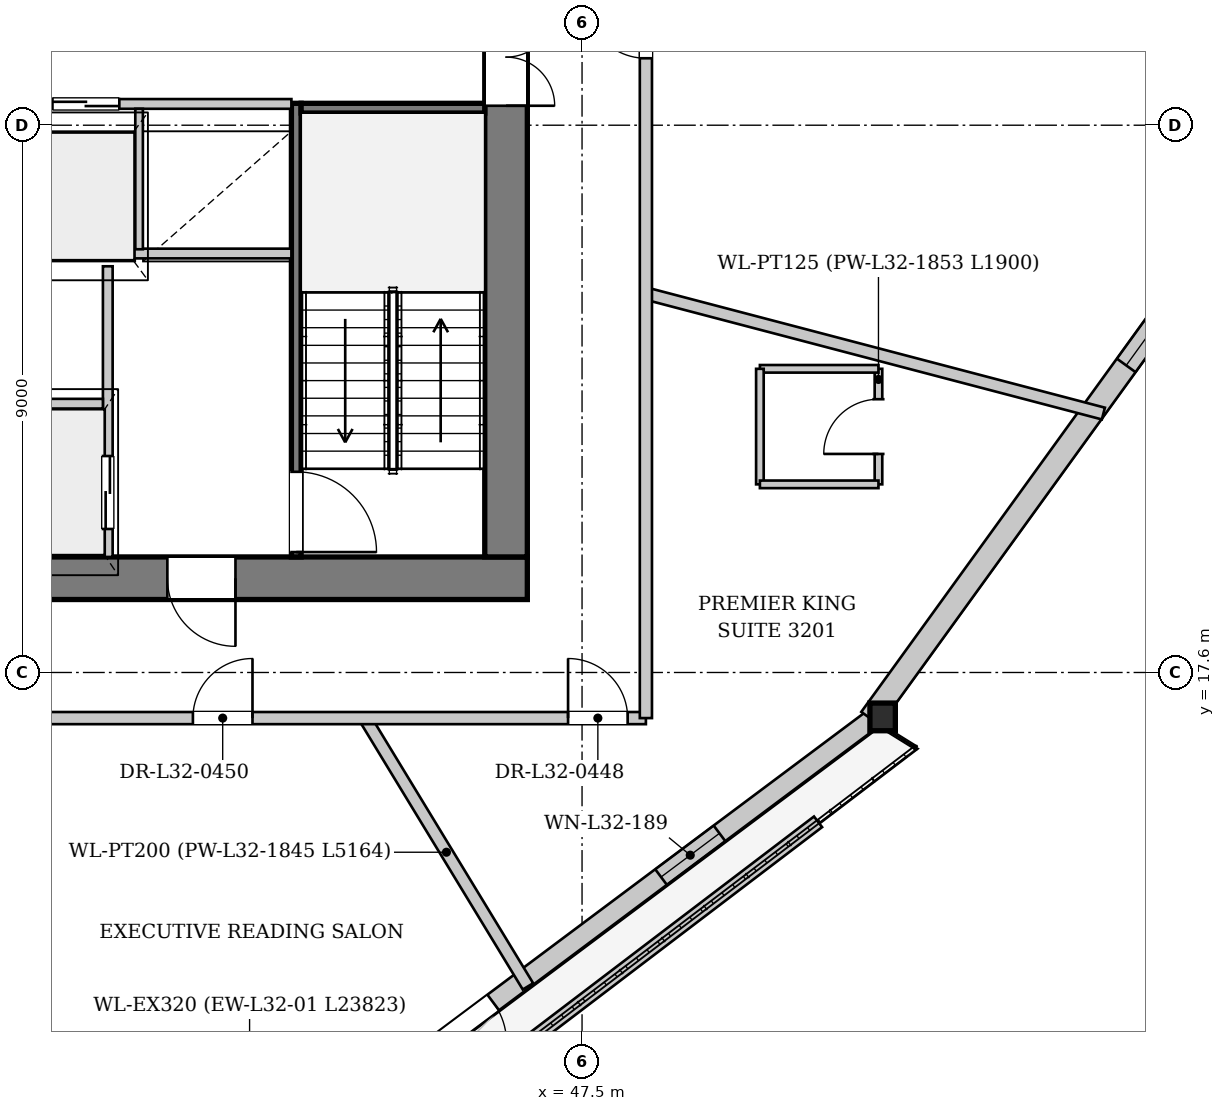
"""IFC4 building model, lengths in metres.
Left out: names, types, materials, properties, quantities, classifications, styles, units other than length and angle.
Written with IfcOpenShell. Run it as: python <this file> out.ifc"""

import sys

from ifc_helpers import new_model, si_unit, direction, frame, frame_2d, origin, origin_2d, place, context, subcontext, project, spatial, rectangle, i_section, extrude, source, transform, mapped, element, fill, save


model = new_model("IFC4")
c1 = context("Model", 3, precision=1e-05, world=origin(), true_north=direction((0.0, 1.0)))
c2 = subcontext(c1, "Body", "Model", "MODEL_VIEW")
j1 = project(units=[si_unit("LENGTHUNIT", "METRE"), si_unit("PLANEANGLEUNIT", "RADIAN")], contexts=[c1])
p1 = place(None, origin())
s1 = spatial("IfcSite", under=j1, at=p1, CompositionType="ELEMENT")
p2 = place(p1, origin())
s2 = spatial("IfcBuilding", under=s1, at=p2, CompositionType="ELEMENT")
p3 = place(p2, frame((0.0, 0.0, 123.45)))
s3 = spatial("IfcBuildingStorey", under=s2, at=p3, CompositionType="ELEMENT", Elevation=123.45)
m1 = source(origin(), c2, "Body", "SweptSolid", [
    extrude(i_section(OverallWidth=0.418, OverallDepth=0.455, WebThickness=0.038, FlangeThickness=0.059, at=origin_2d()), origin(), (0.0, 0.0, 1.0), 3.398),
])
p4 = place(p3, frame((52.4, 16.729, 0.0), z_axis=(0.025364652364, 0.082560865627, 0.996263187053), x_axis=(-0.955904837119, 0.293676594868, 0.0)))
e1 = element("IfcColumn", 1, at=p4, inside=s3, PredefinedType="COLUMN", context=c2, shape_type="MappedRepresentation", body=[
    mapped(m1, transform((0.0, 0.0, 0.0), x_axis=(1.0, 0.0, 0.0), y_axis=(0.0, 1.0, 0.0), z_axis=(0.0, 0.0, 1.0), scale=1.0)),
])
p5 = place(p3, frame((52.305, 16.857, 0.0), z_axis=(0.0, 0.0, 1.0), x_axis=(-0.800901761672, -0.598795764974, 0.0)))
e2 = element("IfcWall", 2, at=p5, inside=s3, PredefinedType="SOLIDWALL", context=c2, shape_type="SweptSolid", body=[
    extrude(rectangle(XDim=23.823, YDim=0.32, at=frame_2d((11.911, 0.0))), origin(), (0.0, 0.0, 1.0), 2.692),
])
p6 = place(p5, frame((7.823, 0.0, 0.0)))
e3 = element("IfcOpeningElement", 3, at=p6, cuts=e2, PredefinedType="OPENING", context=c2, shape_type="SweptSolid", body=[
    extrude(rectangle(XDim=1.1, YDim=2.3, at=frame_2d((0.55, 1.15))), frame((0.0, 0.17, 0.0), z_axis=(0.0, -1.0, 0.0), x_axis=(1.0, 0.0, 0.0)), (0.0, 0.0, 1.0), 0.34),
])
p7 = place(p5, frame((16.729, 0.0, 0.372)))
e4 = element("IfcOpeningElement", 4, at=p7, cuts=e2, PredefinedType="OPENING", context=c2, shape_type="SweptSolid", body=[
    extrude(rectangle(XDim=1.8, YDim=2.2, at=frame_2d((0.9, 1.1))), frame((0.0, 0.17, 0.0), z_axis=(0.0, -1.0, 0.0), x_axis=(1.0, 0.0, 0.0)), (0.0, 0.0, 1.0), 0.34),
])
p8 = place(p5, frame((3.177, 0.0, 0.65)))
e5 = element("IfcOpeningElement", 5, at=p8, cuts=e2, PredefinedType="OPENING", context=c2, shape_type="SweptSolid", body=[
    extrude(rectangle(XDim=1.2, YDim=1.5, at=frame_2d((0.6, 0.75))), frame((0.0, 0.17, 0.0), z_axis=(0.0, -1.0, 0.0), x_axis=(1.0, 0.0, 0.0)), (0.0, 0.0, 1.0), 0.34),
])
p9 = place(p3, frame((66.21, 36.142, 0.0), z_axis=(0.0, 0.0, 1.0), x_axis=(-0.586152279149, -0.810200904497, 0.0)))
e6 = element("IfcWall", 6, at=p9, inside=s3, PredefinedType="SOLIDWALL", context=c2, shape_type="SweptSolid", body=[
    extrude(rectangle(XDim=23.823, YDim=0.38, at=frame_2d((11.911, 0.0))), origin(), (0.0, 0.0, 1.0), 2.692),
])
p10 = place(p9, frame((5.57, 0.0, 0.322)))
e7 = element("IfcOpeningElement", 7, at=p10, cuts=e6, PredefinedType="OPENING", context=c2, shape_type="SweptSolid", body=[
    extrude(rectangle(XDim=2.2, YDim=2.25, at=frame_2d((1.1, 1.125))), frame((0.0, 0.2, 0.0), z_axis=(0.0, -1.0, 0.0), x_axis=(1.0, 0.0, 0.0)), (0.0, 0.0, 1.0), 0.4),
])
p11 = place(p9, frame((14.452, 0.0, 0.322)))
e8 = element("IfcOpeningElement", 8, at=p11, cuts=e6, PredefinedType="OPENING", context=c2, shape_type="SweptSolid", body=[
    extrude(rectangle(XDim=2.2, YDim=2.25, at=frame_2d((1.1, 1.125))), frame((0.0, 0.2, 0.0), z_axis=(0.0, -1.0, 0.0), x_axis=(1.0, 0.0, 0.0)), (0.0, 0.0, 1.0), 0.4),
])
p12 = place(p3, frame((34.529, 2.323, 0.0), z_axis=(0.0, 0.0, 1.0), x_axis=(0.795860822031, 0.605479604905, 0.0)))
e9 = element("IfcWall", 9, at=p12, inside=s3, PredefinedType="PARAPET", context=c2, shape_type="SweptSolid", body=[
    extrude(rectangle(XDim=21.175, YDim=0.22, at=frame_2d((10.587, 0.0))), origin(), (0.0, 0.0, 1.0), 0.3),
])
p13 = place(p3, frame((46.6, 19.15, 0.0), z_axis=(0.0, 0.0, 1.0), x_axis=(-1.0, 0.0, 0.0)))
e10 = element("IfcWall", 10, at=p13, inside=s3, PredefinedType="SHEAR", context=c2, shape_type="SweptSolid", body=[
    extrude(rectangle(XDim=17.2, YDim=0.7, at=frame_2d((8.6, 0.0))), origin(), (0.0, 0.0, 1.0), 3.3),
])
p14 = place(p13, frame((4.8, 0.0, 0.0)))
e11 = element("IfcOpeningElement", 11, at=p14, cuts=e10, PredefinedType="OPENING", context=c2, shape_type="SweptSolid", body=[
    extrude(rectangle(XDim=1.12, YDim=2.25, at=frame_2d((0.56, 1.125))), frame((0.0, 0.36, 0.0), z_axis=(0.0, -1.0, 0.0), x_axis=(1.0, 0.0, 0.0)), (0.0, 0.0, 1.0), 0.72),
])
p15 = place(p13, frame((11.3, 0.0, 0.0)))
e12 = element("IfcOpeningElement", 12, at=p15, cuts=e10, PredefinedType="OPENING", context=c2, shape_type="SweptSolid", body=[
    extrude(rectangle(XDim=1.12, YDim=2.25, at=frame_2d((0.56, 1.125))), frame((0.0, 0.36, 0.0), z_axis=(0.0, -1.0, 0.0), x_axis=(1.0, 0.0, 0.0)), (0.0, 0.0, 1.0), 0.72),
])
p16 = place(p3, frame((46.25, 33.7, 0.0), z_axis=(0.0, 0.0, 1.0), x_axis=(0.0, -1.0, 0.0)))
e13 = element("IfcWall", 13, at=p16, inside=s3, PredefinedType="SHEAR", context=c2, shape_type="SweptSolid", body=[
    extrude(rectangle(XDim=14.2, YDim=0.7, at=frame_2d((7.1, 0.0))), origin(), (0.0, 0.0, 1.0), 3.3),
])
p17 = place(p16, frame((5.18, 0.0, 0.0)))
e14 = element("IfcOpeningElement", 14, at=p17, cuts=e13, PredefinedType="OPENING", context=c2, shape_type="SweptSolid", body=[
    extrude(rectangle(XDim=1.6, YDim=2.2, at=frame_2d((0.8, 1.1))), frame((0.0, 0.36, 0.0), z_axis=(0.0, -1.0, 0.0), x_axis=(1.0, 0.0, 0.0)), (0.0, 0.0, 1.0), 0.72),
])
p18 = place(p3, frame((42.8, 26.96, 0.0), z_axis=(0.0, 0.0, 1.0), x_axis=(0.0, -1.0, 0.0)))
e15 = element("IfcWall", 15, at=p18, inside=s3, PredefinedType="PARTITIONING", context=c2, shape_type="SweptSolid", body=[
    extrude(rectangle(XDim=7.46, YDim=0.16, at=frame_2d((3.73, 0.0))), origin(), (0.0, 0.0, 1.0), 3.3),
])
p19 = place(p18, frame((6.06, 0.0, 0.0)))
e16 = element("IfcOpeningElement", 16, at=p19, cuts=e15, PredefinedType="OPENING", context=c2, shape_type="SweptSolid", body=[
    extrude(rectangle(XDim=1.32, YDim=2.2, at=frame_2d((0.66, 1.1))), frame((0.0, 0.09, 0.0), z_axis=(0.0, -1.0, 0.0), x_axis=(1.0, 0.0, 0.0)), (0.0, 0.0, 1.0), 0.18),
])
p20 = place(p3, frame((42.88, 26.88, 0.0), z_axis=(0.0, 0.0, 1.0), x_axis=(1.0, 0.0, 0.0)))
e17 = element("IfcWall", 17, at=p20, inside=s3, PredefinedType="PARTITIONING", context=c2, shape_type="SweptSolid", body=[
    extrude(rectangle(XDim=3.02, YDim=0.16, at=frame_2d((1.51, 0.0))), origin(), (0.0, 0.0, 1.0), 3.3),
])
p21 = place(p3, frame((39.7, 24.28, 0.0), z_axis=(0.0, 0.0, 1.0), x_axis=(0.0, -1.0, 0.0)))
e18 = element("IfcWall", 18, at=p21, inside=s3, PredefinedType="PARTITIONING", context=c2, shape_type="SweptSolid", body=[
    extrude(rectangle(XDim=4.78, YDim=0.16, at=frame_2d((2.39, 0.0))), origin(), (0.0, 0.0, 1.0), 3.3),
])
p22 = place(p21, frame((3.12, 0.0, 0.0)))
e19 = element("IfcOpeningElement", 19, at=p22, cuts=e18, PredefinedType="OPENING", context=c2, shape_type="SweptSolid", body=[
    extrude(rectangle(XDim=1.2, YDim=2.2, at=frame_2d((0.6, 1.1))), frame((0.0, 0.09, 0.0), z_axis=(0.0, -1.0, 0.0), x_axis=(1.0, 0.0, 0.0)), (0.0, 0.0, 1.0), 0.18),
])
p23 = place(p3, frame((36.38, 22.02, 0.0), z_axis=(0.0, 0.0, 1.0), x_axis=(1.0, 0.0, 0.0)))
e20 = element("IfcWall", 20, at=p23, inside=s3, PredefinedType="PARTITIONING", context=c2, shape_type="SweptSolid", body=[
    extrude(rectangle(XDim=3.24, YDim=0.16, at=frame_2d((1.62, 0.0))), origin(), (0.0, 0.0, 1.0), 3.3),
])
p24 = place(p3, frame((33.28, 24.49, 0.0), z_axis=(0.0, 0.0, 1.0), x_axis=(1.0, 0.0, 0.0)))
e21 = element("IfcWall", 21, at=p24, inside=s3, PredefinedType="PARTITIONING", context=c2, shape_type="SweptSolid", body=[
    extrude(rectangle(XDim=9.44, YDim=0.16, at=frame_2d((4.72, 0.0))), origin(), (0.0, 0.0, 1.0), 3.3),
])
p25 = place(p3, frame((33.28, 26.95, 0.0), z_axis=(0.0, 0.0, 1.0), x_axis=(1.0, 0.0, 0.0)))
e22 = element("IfcWall", 22, at=p25, inside=s3, PredefinedType="PARTITIONING", context=c2, shape_type="SweptSolid", body=[
    extrude(rectangle(XDim=9.44, YDim=0.16, at=frame_2d((4.72, 0.0))), origin(), (0.0, 0.0, 1.0), 3.3),
])
p26 = place(p25, frame((0.26, 0.0, 0.0)))
e23 = element("IfcOpeningElement", 23, at=p26, cuts=e22, PredefinedType="OPENING", context=c2, shape_type="SweptSolid", body=[
    extrude(rectangle(XDim=1.1, YDim=2.2, at=frame_2d((0.55, 1.1))), frame((0.0, 0.09, 0.0), z_axis=(0.0, -1.0, 0.0), x_axis=(1.0, 0.0, 0.0)), (0.0, 0.0, 1.0), 0.18),
])
p27 = place(p25, frame((2.01, 0.0, 0.0)))
e24 = element("IfcOpeningElement", 24, at=p27, cuts=e22, PredefinedType="OPENING", context=c2, shape_type="SweptSolid", body=[
    extrude(rectangle(XDim=1.1, YDim=2.2, at=frame_2d((0.55, 1.1))), frame((0.0, 0.09, 0.0), z_axis=(0.0, -1.0, 0.0), x_axis=(1.0, 0.0, 0.0)), (0.0, 0.0, 1.0), 0.18),
])
p28 = place(p25, frame((3.76, 0.0, 0.0)))
e25 = element("IfcOpeningElement", 25, at=p28, cuts=e22, PredefinedType="OPENING", context=c2, shape_type="SweptSolid", body=[
    extrude(rectangle(XDim=1.1, YDim=2.2, at=frame_2d((0.55, 1.1))), frame((0.0, 0.09, 0.0), z_axis=(0.0, -1.0, 0.0), x_axis=(1.0, 0.0, 0.0)), (0.0, 0.0, 1.0), 0.18),
])
p29 = place(p25, frame((5.51, 0.0, 0.0)))
e26 = element("IfcOpeningElement", 26, at=p29, cuts=e22, PredefinedType="OPENING", context=c2, shape_type="SweptSolid", body=[
    extrude(rectangle(XDim=1.1, YDim=2.2, at=frame_2d((0.55, 1.1))), frame((0.0, 0.09, 0.0), z_axis=(0.0, -1.0, 0.0), x_axis=(1.0, 0.0, 0.0)), (0.0, 0.0, 1.0), 0.18),
])
p30 = place(p3, frame((40.215, 24.56, 0.0), z_axis=(0.0, 0.0, 1.0), x_axis=(0.0, 1.0, 0.0)))
e27 = element("IfcWall", 27, at=p30, inside=s3, PredefinedType="PARTITIONING", context=c2, shape_type="SweptSolid", body=[
    extrude(rectangle(XDim=2.31, YDim=0.125, at=frame_2d((1.155, 0.0))), origin(), (0.0, 0.0, 1.0), 3.3),
])
p31 = place(p3, frame((43.928, 16.85, 0.0), z_axis=(0.0, 0.0, 1.0), x_axis=(0.519520898973, -0.85445774356, 0.0)))
e28 = element("IfcWall", 28, at=p31, inside=s3, PredefinedType="PARTITIONING", context=c2, shape_type="SweptSolid", body=[
    extrude(rectangle(XDim=5.164, YDim=0.2, at=frame_2d((2.582, 0.0))), origin(), (0.0, 0.0, 1.0), 3.3),
])
p32 = place(p3, frame((48.55, 23.832, 0.0), z_axis=(0.0, 0.0, 1.0), x_axis=(0.967269395898, -0.253751681295, 0.0)))
e29 = element("IfcWall", 29, at=p32, inside=s3, PredefinedType="PARTITIONING", context=c2, shape_type="SweptSolid", body=[
    extrude(rectangle(XDim=7.779, YDim=0.2, at=frame_2d((3.889, 0.0))), origin(), (0.0, 0.0, 1.0), 3.3),
])
p33 = place(p3, frame((52.375, 20.694, 0.0), z_axis=(0.0, 0.0, 1.0), x_axis=(0.0, 1.0, 0.0)))
e30 = element("IfcWall", 30, at=p33, inside=s3, PredefinedType="PARTITIONING", context=c2, shape_type="SweptSolid", body=[
    extrude(rectangle(XDim=1.9, YDim=0.125, at=frame_2d((0.95, 0.0))), origin(), (0.0, 0.0, 1.0), 3.3),
])
p34 = place(p33, frame((0.5, 0.0, 0.0)))
e31 = element("IfcOpeningElement", 31, at=p34, cuts=e30, PredefinedType="OPENING", context=c2, shape_type="SweptSolid", body=[
    extrude(rectangle(XDim=0.9, YDim=2.1, at=frame_2d((0.45, 1.05))), frame((0.0, 0.073, 0.0), z_axis=(0.0, -1.0, 0.0), x_axis=(1.0, 0.0, 0.0)), (0.0, 0.0, 1.0), 0.145),
])
p35 = place(p3, frame((52.375, 22.594, 0.0), z_axis=(0.0, 0.0, 1.0), x_axis=(-1.0, 0.0, 0.0)))
e32 = element("IfcWall", 32, at=p35, inside=s3, PredefinedType="PARTITIONING", context=c2, shape_type="SweptSolid", body=[
    extrude(rectangle(XDim=1.95, YDim=0.125, at=frame_2d((0.975, 0.0))), origin(), (0.0, 0.0, 1.0), 3.3),
])
p36 = place(p3, frame((50.425, 22.594, 0.0), z_axis=(0.0, 0.0, 1.0), x_axis=(0.0, -1.0, 0.0)))
e33 = element("IfcWall", 33, at=p36, inside=s3, PredefinedType="PARTITIONING", context=c2, shape_type="SweptSolid", body=[
    extrude(rectangle(XDim=1.9, YDim=0.125, at=frame_2d((0.95, 0.0))), origin(), (0.0, 0.0, 1.0), 3.3),
])
p37 = place(p3, frame((50.425, 20.694, 0.0), z_axis=(0.0, 0.0, 1.0), x_axis=(1.0, 0.0, 0.0)))
e34 = element("IfcWall", 34, at=p37, inside=s3, PredefinedType="PARTITIONING", context=c2, shape_type="SweptSolid", body=[
    extrude(rectangle(XDim=1.95, YDim=0.125, at=frame_2d((0.975, 0.0))), origin(), (0.0, 0.0, 1.0), 3.3),
])
p38 = place(p3, frame((27.45, 16.85, 0.0), z_axis=(0.0, 0.0, 1.0), x_axis=(1.0, 0.0, 0.0)))
e35 = element("IfcWall", 35, at=p38, inside=s3, PredefinedType="PARTITIONING", context=c2, shape_type="SweptSolid", body=[
    extrude(rectangle(XDim=21.1, YDim=0.2, at=frame_2d((10.55, 0.0))), origin(), (0.0, 0.0, 1.0), 2.985),
])
p39 = place(p38, frame((19.82, 0.0, 0.0)))
e36 = element("IfcOpeningElement", 36, at=p39, cuts=e35, PredefinedType="OPENING", context=c2, shape_type="SweptSolid", body=[
    extrude(rectangle(XDim=0.98, YDim=2.15, at=frame_2d((0.49, 1.075))), frame((0.0, 0.11, 0.0), z_axis=(0.0, -1.0, 0.0), x_axis=(1.0, 0.0, 0.0)), (0.0, 0.0, 1.0), 0.22),
])
p40 = place(p38, frame((2.494, 0.0, 0.0)))
e37 = element("IfcOpeningElement", 37, at=p40, cuts=e35, PredefinedType="OPENING", context=c2, shape_type="SweptSolid", body=[
    extrude(rectangle(XDim=0.98, YDim=2.15, at=frame_2d((0.49, 1.075))), frame((0.0, 0.11, 0.0), z_axis=(0.0, -1.0, 0.0), x_axis=(1.0, 0.0, 0.0)), (0.0, 0.0, 1.0), 0.22),
])
p41 = place(p38, frame((13.65, 0.0, 0.0)))
e38 = element("IfcOpeningElement", 38, at=p41, cuts=e35, PredefinedType="OPENING", context=c2, shape_type="SweptSolid", body=[
    extrude(rectangle(XDim=0.98, YDim=2.15, at=frame_2d((0.49, 1.075))), frame((0.0, 0.11, 0.0), z_axis=(0.0, -1.0, 0.0), x_axis=(1.0, 0.0, 0.0)), (0.0, 0.0, 1.0), 0.22),
])
p42 = place(p3, frame((48.55, 16.85, 0.0), z_axis=(0.0, 0.0, 1.0), x_axis=(0.0, 1.0, 0.0)))
e39 = element("IfcWall", 39, at=p42, inside=s3, PredefinedType="PARTITIONING", context=c2, shape_type="SweptSolid", body=[
    extrude(rectangle(XDim=19.5, YDim=0.2, at=frame_2d((9.75, 0.0))), origin(), (0.0, 0.0, 1.0), 3.3),
])
p43 = place(p42, frame((10.851, 0.0, 0.0)))
e40 = element("IfcOpeningElement", 40, at=p43, cuts=e39, PredefinedType="OPENING", context=c2, shape_type="SweptSolid", body=[
    extrude(rectangle(XDim=0.98, YDim=2.15, at=frame_2d((0.49, 1.075))), frame((0.0, 0.11, 0.0), z_axis=(0.0, -1.0, 0.0), x_axis=(1.0, 0.0, 0.0)), (0.0, 0.0, 1.0), 0.22),
])
m2 = source(origin(), c2, "Body", "SweptSolid", [
    extrude(rectangle(XDim=1.1, YDim=2.3, at=frame_2d((0.55, 1.15))), frame((0.0, 0.025, 0.0), z_axis=(0.0, -1.0, 0.0), x_axis=(1.0, 0.0, 0.0)), (0.0, 0.0, 1.0), 0.05),
])
p44 = place(p6, origin())
e41 = element("IfcDoor", 41, at=p44, inside=s3, OperationType="SINGLE_SWING_RIGHT", PredefinedType="DOOR", context=c2, shape_type="MappedRepresentation", body=[
    mapped(m2, transform((0.0, 0.0, 0.0), x_axis=(1.0, 0.0, 0.0), y_axis=(0.0, 1.0, 0.0), z_axis=(0.0, 0.0, 1.0), scale=1.0)),
])
fill(e3, e41)
m3 = source(origin(), c2, "Body", "SweptSolid", [
    extrude(rectangle(XDim=2.2, YDim=2.25, at=frame_2d((1.1, 1.125))), frame((0.0, 0.03, 0.0), z_axis=(0.0, -1.0, 0.0), x_axis=(1.0, 0.0, 0.0)), (0.0, 0.0, 1.0), 0.06),
])
p45 = place(p11, origin())
e42 = element("IfcWindow", 42, at=p45, inside=s3, PartitioningType="SINGLE_PANEL", PredefinedType="WINDOW", context=c2, shape_type="MappedRepresentation", body=[
    mapped(m3, transform((0.0, 0.0, 0.0), x_axis=(1.0, 0.0, 0.0), y_axis=(0.0, 1.0, 0.0), z_axis=(0.0, 0.0, 1.0), scale=1.0)),
])
fill(e8, e42)
m4 = source(origin(), c2, "Body", "SweptSolid", [
    extrude(rectangle(XDim=1.2, YDim=1.5, at=frame_2d((0.6, 0.75))), frame((0.0, 0.03, 0.0), z_axis=(0.0, -1.0, 0.0), x_axis=(1.0, 0.0, 0.0)), (0.0, 0.0, 1.0), 0.06),
])
p46 = place(p8, origin())
e43 = element("IfcWindow", 43, at=p46, inside=s3, PartitioningType="SINGLE_PANEL", PredefinedType="WINDOW", context=c2, shape_type="MappedRepresentation", body=[
    mapped(m4, transform((0.0, 0.0, 0.0), x_axis=(1.0, 0.0, 0.0), y_axis=(0.0, 1.0, 0.0), z_axis=(0.0, 0.0, 1.0), scale=1.0)),
])
fill(e5, e43)
m5 = source(origin(), c2, "Body", "SweptSolid", [
    extrude(rectangle(XDim=1.12, YDim=2.25, at=frame_2d((0.56, 1.125))), frame((0.0, 0.025, 0.0), z_axis=(0.0, -1.0, 0.0), x_axis=(1.0, 0.0, 0.0)), (0.0, 0.0, 1.0), 0.05),
])
p47 = place(p14, origin())
e44 = element("IfcDoor", 44, at=p47, inside=s3, OperationType="SINGLE_SWING_LEFT", PredefinedType="DOOR", context=c2, shape_type="MappedRepresentation", body=[
    mapped(m5, transform((0.0, 0.0, 0.0), x_axis=(1.0, 0.0, 0.0), y_axis=(0.0, 1.0, 0.0), z_axis=(0.0, 0.0, 1.0), scale=1.0)),
])
fill(e11, e44)
m6 = source(origin(), c2, "Body", "SweptSolid", [
    extrude(rectangle(XDim=1.6, YDim=2.2, at=frame_2d((0.8, 1.1))), frame((0.0, 0.025, 0.0), z_axis=(0.0, -1.0, 0.0), x_axis=(1.0, 0.0, 0.0)), (0.0, 0.0, 1.0), 0.05),
])
p48 = place(p17, origin())
e45 = element("IfcDoor", 45, at=p48, inside=s3, OperationType="DOUBLE_DOOR_SINGLE_SWING", PredefinedType="DOOR", context=c2, shape_type="MappedRepresentation", body=[
    mapped(m6, transform((0.0, 0.0, 0.0), x_axis=(1.0, 0.0, 0.0), y_axis=(0.0, 1.0, 0.0), z_axis=(0.0, 0.0, 1.0), scale=1.0)),
])
fill(e14, e45)
m7 = source(origin(), c2, "Body", "SweptSolid", [
    extrude(rectangle(XDim=1.32, YDim=2.2, at=frame_2d((0.66, 1.1))), frame((0.0, 0.025, 0.0), z_axis=(0.0, -1.0, 0.0), x_axis=(1.0, 0.0, 0.0)), (0.0, 0.0, 1.0), 0.05),
])
p49 = place(p19, origin())
e46 = element("IfcDoor", 46, at=p49, inside=s3, OperationType="SINGLE_SWING_RIGHT", PredefinedType="DOOR", context=c2, shape_type="MappedRepresentation", body=[
    mapped(m7, transform((0.0, 0.0, 0.0), x_axis=(1.0, 0.0, 0.0), y_axis=(0.0, 1.0, 0.0), z_axis=(0.0, 0.0, 1.0), scale=1.0)),
])
fill(e16, e46)
m8 = source(origin(), c2, "Body", "SweptSolid", [
    extrude(rectangle(XDim=1.2, YDim=2.2, at=frame_2d((0.6, 1.1))), frame((0.0, 0.025, 0.0), z_axis=(0.0, -1.0, 0.0), x_axis=(1.0, 0.0, 0.0)), (0.0, 0.0, 1.0), 0.05),
])
p50 = place(p22, origin())
e47 = element("IfcDoor", 47, at=p50, inside=s3, OperationType="DOUBLE_DOOR_SLIDING", PredefinedType="DOOR", context=c2, shape_type="MappedRepresentation", body=[
    mapped(m8, transform((0.0, 0.0, 0.0), x_axis=(1.0, 0.0, 0.0), y_axis=(0.0, 1.0, 0.0), z_axis=(0.0, 0.0, 1.0), scale=1.0)),
])
fill(e19, e47)
m9 = source(origin(), c2, "Body", "SweptSolid", [
    extrude(rectangle(XDim=1.1, YDim=2.2, at=frame_2d((0.55, 1.1))), frame((0.0, 0.025, 0.0), z_axis=(0.0, -1.0, 0.0), x_axis=(1.0, 0.0, 0.0)), (0.0, 0.0, 1.0), 0.05),
])
p51 = place(p29, origin())
e48 = element("IfcDoor", 48, at=p51, inside=s3, OperationType="DOUBLE_DOOR_SLIDING", PredefinedType="DOOR", context=c2, shape_type="MappedRepresentation", body=[
    mapped(m9, transform((0.0, 0.0, 0.0), x_axis=(1.0, 0.0, 0.0), y_axis=(0.0, 1.0, 0.0), z_axis=(0.0, 0.0, 1.0), scale=1.0)),
])
fill(e26, e48)
m10 = source(origin(), c2, "Body", "SweptSolid", [
    extrude(rectangle(XDim=0.9, YDim=2.1, at=frame_2d((0.45, 1.05))), frame((0.0, 0.025, 0.0), z_axis=(0.0, -1.0, 0.0), x_axis=(1.0, 0.0, 0.0)), (0.0, 0.0, 1.0), 0.05),
])
p52 = place(p34, origin())
e49 = element("IfcDoor", 49, at=p52, inside=s3, OperationType="SINGLE_SWING_LEFT", PredefinedType="DOOR", context=c2, shape_type="MappedRepresentation", body=[
    mapped(m10, transform((0.0, 0.0, 0.0), x_axis=(1.0, 0.0, 0.0), y_axis=(0.0, 1.0, 0.0), z_axis=(0.0, 0.0, 1.0), scale=1.0)),
])
fill(e31, e49)
m11 = source(origin(), c2, "Body", "SweptSolid", [
    extrude(rectangle(XDim=0.98, YDim=2.15, at=frame_2d((0.49, 1.075))), frame((0.0, 0.025, 0.0), z_axis=(0.0, -1.0, 0.0), x_axis=(1.0, 0.0, 0.0)), (0.0, 0.0, 1.0), 0.05),
])
p53 = place(p39, origin())
e50 = element("IfcDoor", 50, at=p53, inside=s3, OperationType="SINGLE_SWING_LEFT", PredefinedType="DOOR", context=c2, shape_type="MappedRepresentation", body=[
    mapped(m11, transform((0.0, 0.0, 0.0), x_axis=(1.0, 0.0, 0.0), y_axis=(0.0, 1.0, 0.0), z_axis=(0.0, 0.0, 1.0), scale=1.0)),
])
fill(e36, e50)
p54 = place(p41, origin())
e51 = element("IfcDoor", 51, at=p54, inside=s3, OperationType="SINGLE_SWING_RIGHT", PredefinedType="DOOR", context=c2, shape_type="MappedRepresentation", body=[
    mapped(m11, transform((0.0, 0.0, 0.0), x_axis=(1.0, 0.0, 0.0), y_axis=(0.0, 1.0, 0.0), z_axis=(0.0, 0.0, 1.0), scale=1.0)),
])
fill(e38, e51)
p55 = place(p43, origin())
e52 = element("IfcDoor", 52, at=p55, inside=s3, OperationType="SINGLE_SWING_RIGHT", PredefinedType="DOOR", context=c2, shape_type="MappedRepresentation", body=[
    mapped(m11, transform((0.0, 0.0, 0.0), x_axis=(1.0, 0.0, 0.0), y_axis=(0.0, 1.0, 0.0), z_axis=(0.0, 0.0, 1.0), scale=1.0)),
])
fill(e40, e52)
save(model, sys.argv[1])
